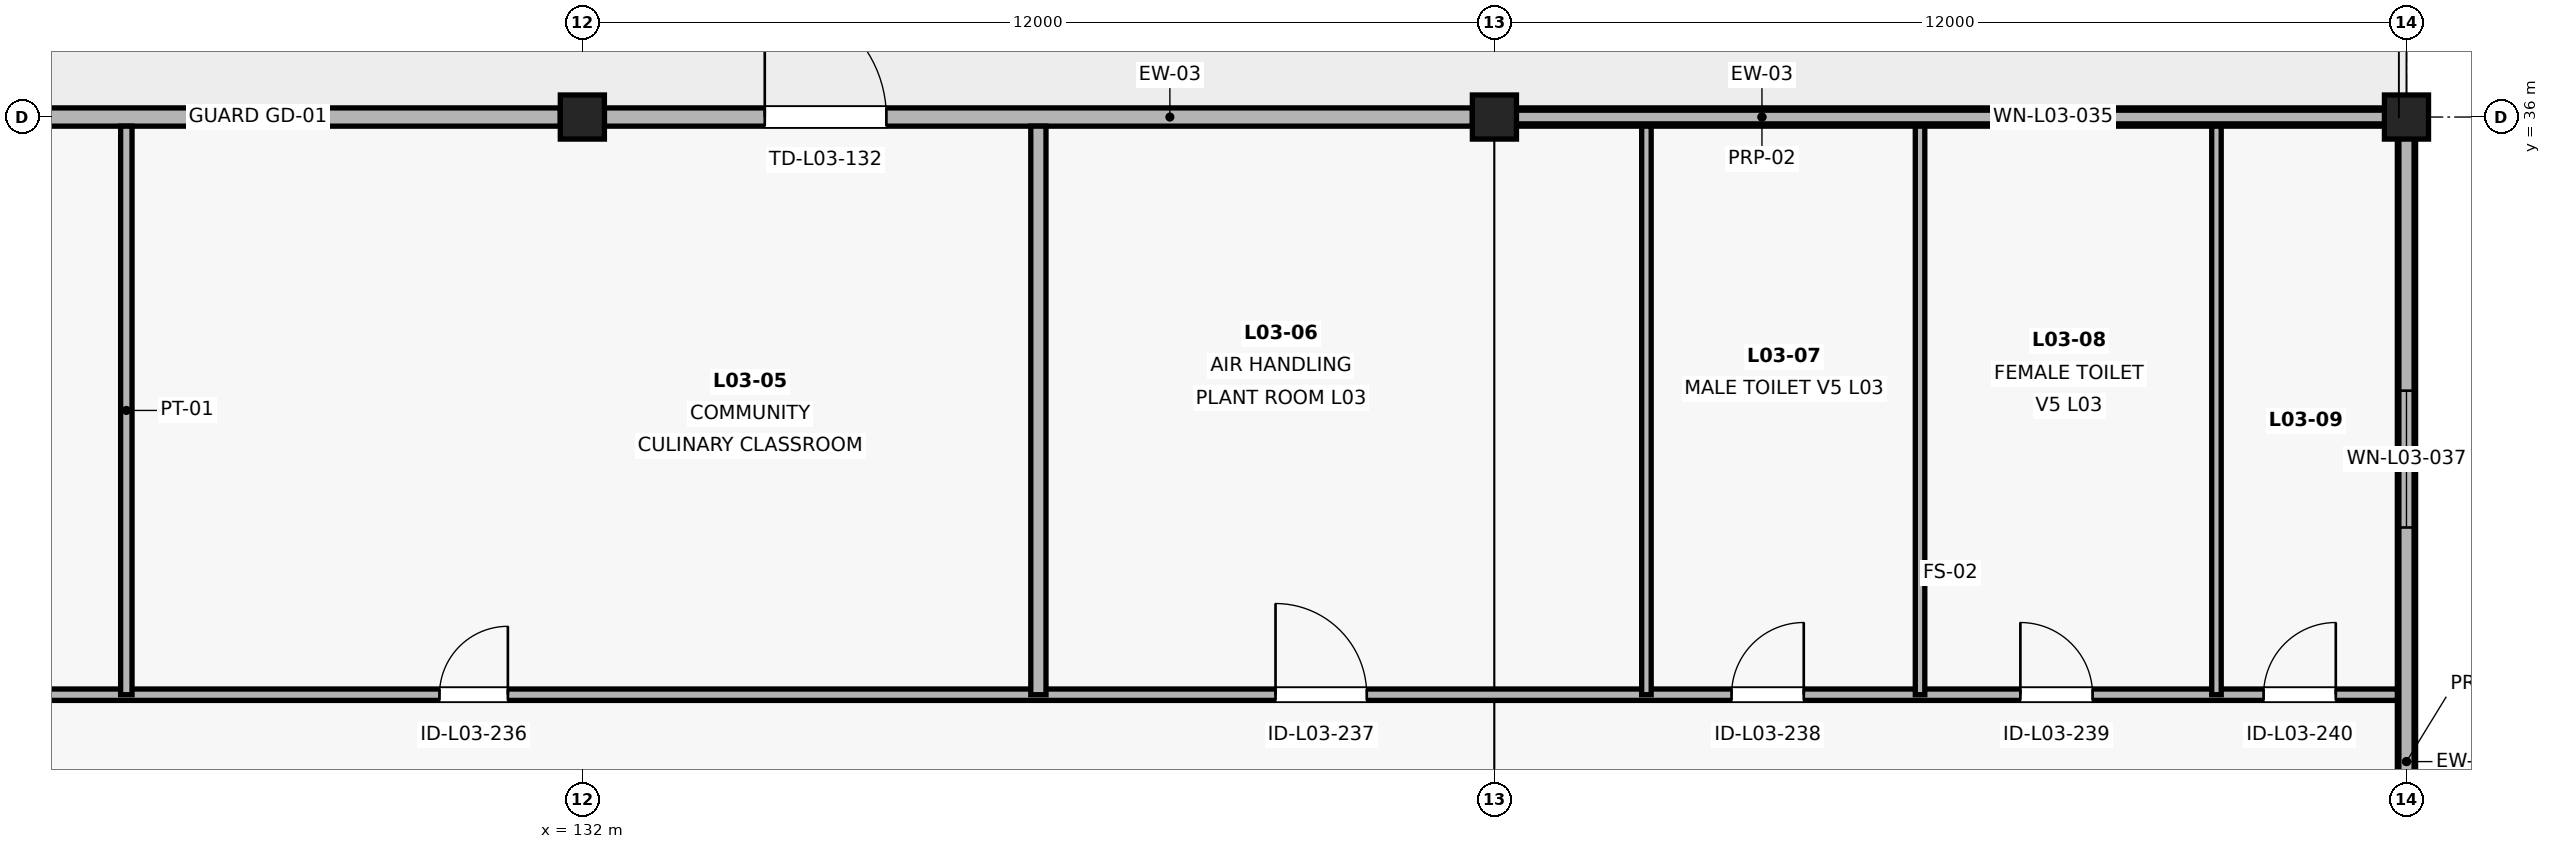
"""IFC4 building model, lengths in metres.
Left out: names, types, materials, properties, quantities, classifications, styles, units other than length and angle.
Written with IfcOpenShell. Run it as: python <this file> out.ifc"""

import sys

from ifc_helpers import new_model, si_unit, direction, frame, frame_2d, origin, origin_2d, place, context, subcontext, project, spatial, rectangle, extrude, element, fill, save


model = new_model("IFC4")
c1 = context("Model", 3, precision=1e-05, world=origin(), true_north=direction((0.0, 1.0)))
c2 = subcontext(c1, "Body", "Model", "MODEL_VIEW")
j1 = project(units=[si_unit("LENGTHUNIT", "METRE"), si_unit("PLANEANGLEUNIT", "RADIAN")], contexts=[c1])
p1 = place(None, origin())
s1 = spatial("IfcSite", under=j1, at=p1, CompositionType="ELEMENT")
p2 = place(p1, origin())
s2 = spatial("IfcBuilding", under=s1, at=p2, CompositionType="ELEMENT")
p3 = place(p2, frame((0.0, 0.0, 16.2)))
s3 = spatial("IfcBuildingStorey", under=s2, at=p3, CompositionType="ELEMENT", Elevation=16.2)
for number, where, z_axis, x_axis in (
    (1, (132.0, 36.0, 0.0), (0.0, 0.0, 1.0), (1.0, 0.0, 0.0)),
    (2, (144.0, 36.0, 0.0), (0.0, 0.0, 1.0), (1.0, 0.0, 0.0)),
    (3, (156.0, 36.0, 0.0), (0.0, 0.0, 1.0), (1.0, 0.0, 0.0)),
):
    element("IfcColumn", number, at=place(p3, frame(where, z_axis=z_axis, x_axis=x_axis)), inside=s3, PredefinedType="COLUMN", context=c2, shape_type="SweptSolid", body=[
        extrude(rectangle(XDim=0.58, YDim=0.58, at=origin_2d()), origin(), (0.0, 0.0, 1.0), 4.8),
    ])
p4 = place(p3, frame((120.29, 36.0, 0.0), z_axis=(0.0, 0.0, 1.0), x_axis=(1.0, 0.0, 0.0)))
e4 = element("IfcWall", 4, at=p4, inside=s3, PredefinedType="SOLIDWALL", context=c2, shape_type="SweptSolid", body=[
    extrude(rectangle(XDim=11.42, YDim=0.24, at=frame_2d((5.71, 0.0))), origin(), (0.0, 0.0, 1.0), 3.608),
])
p5 = place(p4, frame((2.11, 0.0, 0.0)))
e5 = element("IfcOpeningElement", 5, at=p5, cuts=e4, PredefinedType="OPENING", context=c2, shape_type="SweptSolid", body=[
    extrude(rectangle(XDim=1.6, YDim=2.2, at=frame_2d((0.8, 1.1))), frame((0.0, 0.135, 0.0), z_axis=(0.0, -1.0, 0.0), x_axis=(1.0, 0.0, 0.0)), (0.0, 0.0, 1.0), 0.27),
])
p6 = place(p3, frame((132.29, 36.0, 0.0), z_axis=(0.0, 0.0, 1.0), x_axis=(1.0, 0.0, 0.0)))
e6 = element("IfcWall", 6, at=p6, inside=s3, PredefinedType="SOLIDWALL", context=c2, shape_type="SweptSolid", body=[
    extrude(rectangle(XDim=11.42, YDim=0.24, at=frame_2d((5.71, 0.0))), origin(), (0.0, 0.0, 1.0), 3.708),
])
p7 = place(p6, frame((2.11, 0.0, 0.0)))
e7 = element("IfcOpeningElement", 7, at=p7, cuts=e6, PredefinedType="OPENING", context=c2, shape_type="SweptSolid", body=[
    extrude(rectangle(XDim=1.6, YDim=2.2, at=frame_2d((0.8, 1.1))), frame((0.0, 0.135, 0.0), z_axis=(0.0, -1.0, 0.0), x_axis=(1.0, 0.0, 0.0)), (0.0, 0.0, 1.0), 0.27),
])
p8 = place(p3, frame((144.29, 36.0, 0.0), z_axis=(0.0, 0.0, 1.0), x_axis=(1.0, 0.0, 0.0)))
e8 = element("IfcWall", 8, at=p8, inside=s3, PredefinedType="SOLIDWALL", context=c2, shape_type="SweptSolid", body=[
    extrude(rectangle(XDim=11.42, YDim=0.24, at=frame_2d((5.71, 0.0))), origin(), (0.0, 0.0, 1.0), 3.568),
])
p9 = place(p8, frame((6.31, 0.0, 1.5)))
e9 = element("IfcOpeningElement", 9, at=p9, cuts=e8, PredefinedType="OPENING", context=c2, shape_type="SweptSolid", body=[
    extrude(rectangle(XDim=1.5, YDim=1.4, at=frame_2d((0.75, 0.7))), frame((0.0, 0.135, 0.0), z_axis=(0.0, -1.0, 0.0), x_axis=(1.0, 0.0, 0.0)), (0.0, 0.0, 1.0), 0.27),
])
p10 = place(p3, frame((156.0, 35.71, 0.0), z_axis=(0.0, 0.0, 1.0), x_axis=(0.0, -1.0, 0.0)))
e10 = element("IfcWall", 10, at=p10, inside=s3, PredefinedType="SOLIDWALL", context=c2, shape_type="SweptSolid", body=[
    extrude(rectangle(XDim=11.42, YDim=0.24, at=frame_2d((5.71, 0.0))), origin(), (0.0, 0.0, 1.0), 3.568),
])
p11 = place(p10, frame((3.31, 0.0, 1.1)))
e11 = element("IfcOpeningElement", 11, at=p11, cuts=e10, PredefinedType="OPENING", context=c2, shape_type="SweptSolid", body=[
    extrude(rectangle(XDim=1.8, YDim=1.5, at=frame_2d((0.9, 0.75))), frame((0.0, 0.135, 0.0), z_axis=(0.0, -1.0, 0.0), x_axis=(1.0, 0.0, 0.0)), (0.0, 0.0, 1.0), 0.27),
])
p12 = place(p3, frame((156.0, 12.0, 4.8), z_axis=(0.0, 0.0, 1.0), x_axis=(0.0, 1.0, 0.0)))
e12 = element("IfcWall", 12, at=p12, inside=s3, PredefinedType="PARAPET", context=c2, shape_type="SweptSolid", body=[
    extrude(rectangle(XDim=24.0, YDim=0.2, at=frame_2d((12.0, 0.0))), origin(), (0.0, 0.0, 1.0), 1.15),
])
p13 = place(p3, frame((156.0, 36.0, 4.8), z_axis=(0.0, 0.0, 1.0), x_axis=(-1.0, 0.0, 0.0)))
e13 = element("IfcWall", 13, at=p13, inside=s3, PredefinedType="PARAPET", context=c2, shape_type="SweptSolid", body=[
    extrude(rectangle(XDim=12.0, YDim=0.18, at=frame_2d((6.0, 0.0))), origin(), (0.0, 0.0, 1.0), 1.15),
])
p14 = place(p3, frame((108.12, 28.4, 0.0), z_axis=(0.0, 0.0, 1.0), x_axis=(1.0, 0.0, 0.0)))
e14 = element("IfcWall", 14, at=p14, inside=s3, PredefinedType="PARTITIONING", context=c2, shape_type="SweptSolid", body=[
    extrude(rectangle(XDim=47.76, YDim=0.15, at=frame_2d((23.88, 0.0))), origin(), (0.0, 0.0, 1.0), 3.573),
])
p15 = place(p14, frame((8.0, 0.0, 0.0)))
e15 = element("IfcOpeningElement", 15, at=p15, cuts=e14, PredefinedType="OPENING", context=c2, shape_type="SweptSolid", body=[
    extrude(rectangle(XDim=1.0, YDim=2.2, at=frame_2d((0.5, 1.1))), frame((0.0, 0.09, 0.0), z_axis=(0.0, -1.0, 0.0), x_axis=(1.0, 0.0, 0.0)), (0.0, 0.0, 1.0), 0.18),
])
p16 = place(p14, frame((22.0, 0.0, 0.0)))
e16 = element("IfcOpeningElement", 16, at=p16, cuts=e14, PredefinedType="OPENING", context=c2, shape_type="SweptSolid", body=[
    extrude(rectangle(XDim=0.9, YDim=2.1, at=frame_2d((0.45, 1.05))), frame((0.0, 0.09, 0.0), z_axis=(0.0, -1.0, 0.0), x_axis=(1.0, 0.0, 0.0)), (0.0, 0.0, 1.0), 0.18),
])
p17 = place(p14, frame((33.0, 0.0, 0.0)))
e17 = element("IfcOpeningElement", 17, at=p17, cuts=e14, PredefinedType="OPENING", context=c2, shape_type="SweptSolid", body=[
    extrude(rectangle(XDim=1.2, YDim=2.2, at=frame_2d((0.6, 1.1))), frame((0.0, 0.09, 0.0), z_axis=(0.0, -1.0, 0.0), x_axis=(1.0, 0.0, 0.0)), (0.0, 0.0, 1.0), 0.18),
])
p18 = place(p14, frame((39.0, 0.0, 0.0)))
e18 = element("IfcOpeningElement", 18, at=p18, cuts=e14, PredefinedType="OPENING", context=c2, shape_type="SweptSolid", body=[
    extrude(rectangle(XDim=0.95, YDim=2.1, at=frame_2d((0.475, 1.05))), frame((0.0, 0.09, 0.0), z_axis=(0.0, -1.0, 0.0), x_axis=(1.0, 0.0, 0.0)), (0.0, 0.0, 1.0), 0.18),
])
p19 = place(p14, frame((42.8, 0.0, 0.0)))
e19 = element("IfcOpeningElement", 19, at=p19, cuts=e14, PredefinedType="OPENING", context=c2, shape_type="SweptSolid", body=[
    extrude(rectangle(XDim=0.95, YDim=2.1, at=frame_2d((0.475, 1.05))), frame((0.0, 0.09, 0.0), z_axis=(0.0, -1.0, 0.0), x_axis=(1.0, 0.0, 0.0)), (0.0, 0.0, 1.0), 0.18),
])
p20 = place(p14, frame((46.0, 0.0, 0.0)))
e20 = element("IfcOpeningElement", 20, at=p20, cuts=e14, PredefinedType="OPENING", context=c2, shape_type="SweptSolid", body=[
    extrude(rectangle(XDim=0.95, YDim=2.1, at=frame_2d((0.475, 1.05))), frame((0.0, 0.09, 0.0), z_axis=(0.0, -1.0, 0.0), x_axis=(1.0, 0.0, 0.0)), (0.0, 0.0, 1.0), 0.18),
])
p21 = place(p3, frame((126.0, 28.4, 0.0), z_axis=(0.0, 0.0, 1.0), x_axis=(0.0, 1.0, 0.0)))
e21 = element("IfcWall", 21, at=p21, inside=s3, PredefinedType="PARTITIONING", context=c2, shape_type="SweptSolid", body=[
    extrude(rectangle(XDim=7.48, YDim=0.15, at=frame_2d((3.74, 0.0))), origin(), (0.0, 0.0, 1.0), 3.613),
])
p22 = place(p3, frame((138.0, 28.4, 0.0), z_axis=(0.0, 0.0, 1.0), x_axis=(0.0, 1.0, 0.0)))
e22 = element("IfcWall", 22, at=p22, inside=s3, PredefinedType="PARTITIONING", context=c2, shape_type="SweptSolid", body=[
    extrude(rectangle(XDim=7.48, YDim=0.2, at=frame_2d((3.74, 0.0))), origin(), (0.0, 0.0, 1.0), 3.713),
])
for number, where, z_axis, x_axis in (
    (23, (146.0, 28.4, 0.0), (0.0, 0.0, 1.0), (0.0, 1.0, 0.0)),
    (24, (149.6, 28.4, 0.0), (0.0, 0.0, 1.0), (0.0, 1.0, 0.0)),
    (25, (153.5, 28.4, 0.0), (0.0, 0.0, 1.0), (0.0, 1.0, 0.0)),
):
    element("IfcWall", number, at=place(p3, frame(where, z_axis=z_axis, x_axis=x_axis)), inside=s3, PredefinedType="PARTITIONING", context=c2, shape_type="SweptSolid", body=[
        extrude(rectangle(XDim=7.48, YDim=0.125, at=frame_2d((3.74, 0.0))), origin(), (0.0, 0.0, 1.0), 3.573),
    ])
p23 = place(p7, origin())
e26 = element("IfcDoor", 26, at=p23, inside=s3, OperationType="SINGLE_SWING_LEFT", PredefinedType="DOOR", context=c2, shape_type="SweptSolid", body=[
    extrude(rectangle(XDim=1.6, YDim=2.2, at=frame_2d((0.8, 1.1))), frame((0.0, 0.025, 0.0), z_axis=(0.0, -1.0, 0.0), x_axis=(1.0, 0.0, 0.0)), (0.0, 0.0, 1.0), 0.05),
])
fill(e7, e26)
p24 = place(p9, origin())
e27 = element("IfcWindow", 27, at=p24, inside=s3, PartitioningType="SINGLE_PANEL", PredefinedType="WINDOW", context=c2, shape_type="SweptSolid", body=[
    extrude(rectangle(XDim=1.5, YDim=1.4, at=frame_2d((0.75, 0.7))), frame((0.0, 0.03, 0.0), z_axis=(0.0, -1.0, 0.0), x_axis=(1.0, 0.0, 0.0)), (0.0, 0.0, 1.0), 0.06),
])
fill(e9, e27)
p25 = place(p11, origin())
e28 = element("IfcWindow", 28, at=p25, inside=s3, PartitioningType="SINGLE_PANEL", PredefinedType="WINDOW", context=c2, shape_type="SweptSolid", body=[
    extrude(rectangle(XDim=1.8, YDim=1.5, at=frame_2d((0.9, 0.75))), frame((0.0, 0.03, 0.0), z_axis=(0.0, -1.0, 0.0), x_axis=(1.0, 0.0, 0.0)), (0.0, 0.0, 1.0), 0.06),
])
fill(e11, e28)
p26 = place(p16, origin())
e29 = element("IfcDoor", 29, at=p26, inside=s3, OperationType="SINGLE_SWING_RIGHT", PredefinedType="DOOR", context=c2, shape_type="SweptSolid", body=[
    extrude(rectangle(XDim=0.9, YDim=2.1, at=frame_2d((0.45, 1.05))), frame((0.0, 0.025, 0.0), z_axis=(0.0, -1.0, 0.0), x_axis=(1.0, 0.0, 0.0)), (0.0, 0.0, 1.0), 0.05),
])
fill(e16, e29)
p27 = place(p17, origin())
e30 = element("IfcDoor", 30, at=p27, inside=s3, OperationType="SINGLE_SWING_LEFT", PredefinedType="DOOR", context=c2, shape_type="SweptSolid", body=[
    extrude(rectangle(XDim=1.2, YDim=2.2, at=frame_2d((0.6, 1.1))), frame((0.0, 0.025, 0.0), z_axis=(0.0, -1.0, 0.0), x_axis=(1.0, 0.0, 0.0)), (0.0, 0.0, 1.0), 0.05),
])
fill(e17, e30)
p28 = place(p18, origin())
e31 = element("IfcDoor", 31, at=p28, inside=s3, OperationType="SINGLE_SWING_RIGHT", PredefinedType="DOOR", context=c2, shape_type="SweptSolid", body=[
    extrude(rectangle(XDim=0.95, YDim=2.1, at=frame_2d((0.475, 1.05))), frame((0.0, 0.025, 0.0), z_axis=(0.0, -1.0, 0.0), x_axis=(1.0, 0.0, 0.0)), (0.0, 0.0, 1.0), 0.05),
])
fill(e18, e31)
p29 = place(p19, origin())
e32 = element("IfcDoor", 32, at=p29, inside=s3, OperationType="SINGLE_SWING_LEFT", PredefinedType="DOOR", context=c2, shape_type="SweptSolid", body=[
    extrude(rectangle(XDim=0.95, YDim=2.1, at=frame_2d((0.475, 1.05))), frame((0.0, 0.025, 0.0), z_axis=(0.0, -1.0, 0.0), x_axis=(1.0, 0.0, 0.0)), (0.0, 0.0, 1.0), 0.05),
])
fill(e19, e32)
p30 = place(p20, origin())
e33 = element("IfcDoor", 33, at=p30, inside=s3, OperationType="SINGLE_SWING_RIGHT", PredefinedType="DOOR", context=c2, shape_type="SweptSolid", body=[
    extrude(rectangle(XDim=0.95, YDim=2.1, at=frame_2d((0.475, 1.05))), frame((0.0, 0.025, 0.0), z_axis=(0.0, -1.0, 0.0), x_axis=(1.0, 0.0, 0.0)), (0.0, 0.0, 1.0), 0.05),
])
fill(e20, e33)
save(model, sys.argv[1])
